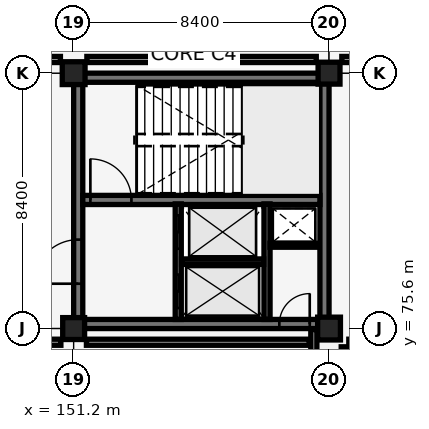
"""IFC4 building model, lengths in metres.
Left out: names, types, materials, properties, quantities, classifications, styles, units other than length and angle.
Written with IfcOpenShell. Run it as: python <this file> out.ifc"""

import sys

from ifc_helpers import new_model, si_unit, direction, frame, frame_2d, origin, origin_2d, place, context, subcontext, project, spatial, rectangle, extrude, element, fill, save


model = new_model("IFC4")
c1 = context("Model", 3, precision=1e-05, world=origin(), true_north=direction((0.0, 1.0)))
c2 = subcontext(c1, "Body", "Model", "MODEL_VIEW")
j1 = project(units=[si_unit("LENGTHUNIT", "METRE"), si_unit("PLANEANGLEUNIT", "RADIAN")], contexts=[c1])
p1 = place(None, origin())
s1 = spatial("IfcSite", under=j1, at=p1, CompositionType="ELEMENT")
p2 = place(p1, origin())
s2 = spatial("IfcBuilding", under=s1, at=p2, CompositionType="ELEMENT")
p3 = place(p2, frame((0.0, 0.0, 5.44)))
s3 = spatial("IfcBuildingStorey", under=s2, at=p3, CompositionType="ELEMENT", Elevation=5.44)
p4 = place(p3, frame((151.35, 75.75, 0.0), z_axis=(0.0, 0.0, 1.0), x_axis=(1.0, 0.0, 0.0)))
e1 = element("IfcWall", 1, at=p4, inside=s3, PredefinedType="SHEAR", context=c2, shape_type="SweptSolid", body=[
    extrude(rectangle(XDim=8.1, YDim=0.3, at=frame_2d((4.05, 0.0))), origin(), (0.0, 0.0, 1.0), 4.12),
])
p5 = place(p4, frame((6.615, 0.0, 0.0)))
e2 = element("IfcOpeningElement", 2, at=p5, cuts=e1, PredefinedType="OPENING", context=c2, shape_type="SweptSolid", body=[
    extrude(rectangle(XDim=1.0, YDim=2.15, at=frame_2d((0.5, 1.075))), frame((0.0, 0.16, 0.0), z_axis=(0.0, -1.0, 0.0), x_axis=(1.0, 0.0, 0.0)), (0.0, 0.0, 1.0), 0.32),
])
p6 = place(p3, frame((151.35, 83.85, 0.0), z_axis=(0.0, 0.0, 1.0), x_axis=(1.0, 0.0, 0.0)))
e3 = element("IfcWall", 3, at=p6, inside=s3, PredefinedType="SHEAR", context=c2, shape_type="SweptSolid", body=[
    extrude(rectangle(XDim=8.1, YDim=0.3, at=frame_2d((4.05, 0.0))), origin(), (0.0, 0.0, 1.0), 4.12),
])
p7 = place(p3, frame((151.35, 75.75, 0.0), z_axis=(0.0, 0.0, 1.0), x_axis=(0.0, 1.0, 0.0)))
e4 = element("IfcWall", 4, at=p7, inside=s3, PredefinedType="SHEAR", context=c2, shape_type="SweptSolid", body=[
    extrude(rectangle(XDim=8.1, YDim=0.3, at=frame_2d((4.05, 0.0))), origin(), (0.0, 0.0, 1.0), 4.12),
])
p8 = place(p7, frame((1.325, 0.0, 0.0)))
e5 = element("IfcOpeningElement", 5, at=p8, cuts=e4, PredefinedType="OPENING", context=c2, shape_type="SweptSolid", body=[
    extrude(rectangle(XDim=1.45, YDim=2.15, at=frame_2d((0.725, 1.075))), frame((0.0, 0.16, 0.0), z_axis=(0.0, -1.0, 0.0), x_axis=(1.0, 0.0, 0.0)), (0.0, 0.0, 1.0), 0.32),
])
p9 = place(p3, frame((159.45, 75.75, 0.0), z_axis=(0.0, 0.0, 1.0), x_axis=(0.0, 1.0, 0.0)))
e6 = element("IfcWall", 6, at=p9, inside=s3, PredefinedType="SHEAR", context=c2, shape_type="SweptSolid", body=[
    extrude(rectangle(XDim=8.1, YDim=0.3, at=frame_2d((4.05, 0.0))), origin(), (0.0, 0.0, 1.0), 4.12),
])
p10 = place(p3, frame((151.5, 79.83, 0.0), z_axis=(0.0, 0.0, 1.0), x_axis=(1.0, 0.0, 0.0)))
e7 = element("IfcWall", 7, at=p10, inside=s3, PredefinedType="SHEAR", context=c2, shape_type="SweptSolid", body=[
    extrude(rectangle(XDim=7.8, YDim=0.3, at=frame_2d((3.9, 0.0))), origin(), (0.0, 0.0, 1.0), 4.12),
])
p11 = place(p10, frame((0.25, 0.0, 0.0)))
e8 = element("IfcOpeningElement", 8, at=p11, cuts=e7, PredefinedType="OPENING", context=c2, shape_type="SweptSolid", body=[
    extrude(rectangle(XDim=1.35, YDim=2.15, at=frame_2d((0.675, 1.075))), frame((0.0, 0.16, 0.0), z_axis=(0.0, -1.0, 0.0), x_axis=(1.0, 0.0, 0.0)), (0.0, 0.0, 1.0), 0.32),
])
p12 = place(p3, frame((151.2, 75.6, 0.0), z_axis=(0.0, 0.0, 1.0), x_axis=(1.0, 0.0, 0.0)))
e9 = element("IfcColumn", 9, at=p12, inside=s3, PredefinedType="COLUMN", context=c2, shape_type="SweptSolid", body=[
    extrude(rectangle(XDim=0.72, YDim=0.72, at=origin_2d()), origin(), (0.0, 0.0, 1.0), 4.12),
])
for number, where, z_axis, x_axis in (
    (10, (151.2, 84.0, 0.0), (0.0, 0.0, 1.0), (1.0, 0.0, 0.0)),
    (11, (159.6, 75.6, 0.0), (0.0, 0.0, 1.0), (1.0, 0.0, 0.0)),
):
    element("IfcColumn", number, at=place(p3, frame(where, z_axis=z_axis, x_axis=x_axis)), inside=s3, PredefinedType="COLUMN", context=c2, shape_type="SweptSolid", body=[
        extrude(rectangle(XDim=0.75, YDim=0.75, at=origin_2d()), origin(), (0.0, 0.0, 1.0), 4.12),
    ])
p13 = place(p3, frame((159.6, 84.0, 0.0), z_axis=(0.0, 0.0, 1.0), x_axis=(1.0, 0.0, 0.0)))
e12 = element("IfcColumn", 12, at=p13, inside=s3, PredefinedType="COLUMN", context=c2, shape_type="SweptSolid", body=[
    extrude(rectangle(XDim=0.72, YDim=0.72, at=origin_2d()), origin(), (0.0, 0.0, 1.0), 4.12),
])
p14 = place(p3, frame((154.64, 75.9, 0.0), z_axis=(0.0, 0.0, 1.0), x_axis=(0.0, 1.0, 0.0)))
e13 = element("IfcWall", 13, at=p14, inside=s3, PredefinedType="SHEAR", context=c2, shape_type="SweptSolid", body=[
    extrude(rectangle(XDim=3.8, YDim=0.2, at=frame_2d((1.9, 0.0))), origin(), (0.0, 0.0, 1.0), 3.44),
])
p15 = place(p14, frame((0.375, 0.0, 0.0)))
e14 = element("IfcOpeningElement", 14, at=p15, cuts=e13, PredefinedType="OPENING", context=c2, shape_type="SweptSolid", body=[
    extrude(rectangle(XDim=1.1, YDim=2.15, at=frame_2d((0.55, 1.075))), frame((0.0, 0.11, 0.0), z_axis=(0.0, -1.0, 0.0), x_axis=(1.0, 0.0, 0.0)), (0.0, 0.0, 1.0), 0.22),
])
p16 = place(p14, frame((2.325, 0.0, 0.0)))
e15 = element("IfcOpeningElement", 15, at=p16, cuts=e13, PredefinedType="OPENING", context=c2, shape_type="SweptSolid", body=[
    extrude(rectangle(XDim=1.1, YDim=2.15, at=frame_2d((0.55, 1.075))), frame((0.0, 0.11, 0.0), z_axis=(0.0, -1.0, 0.0), x_axis=(1.0, 0.0, 0.0)), (0.0, 0.0, 1.0), 0.22),
])
p17 = place(p3, frame((157.56, 75.9, 0.0), z_axis=(0.0, 0.0, 1.0), x_axis=(0.0, 1.0, 0.0)))
e16 = element("IfcWall", 16, at=p17, inside=s3, PredefinedType="SHEAR", context=c2, shape_type="SweptSolid", body=[
    extrude(rectangle(XDim=3.8, YDim=0.2, at=frame_2d((1.9, 0.0))), origin(), (0.0, 0.0, 1.0), 3.44),
])
p18 = place(p3, frame((154.75, 77.8, 0.0), z_axis=(0.0, 0.0, 1.0), x_axis=(1.0, 0.0, 0.0)))
e17 = element("IfcWall", 17, at=p18, inside=s3, PredefinedType="SHEAR", context=c2, shape_type="SweptSolid", body=[
    extrude(rectangle(XDim=2.7, YDim=0.18, at=frame_2d((1.35, 0.0))), origin(), (0.0, 0.0, 1.0), 4.12),
])
p19 = place(p3, frame((157.66, 78.34, 0.0), z_axis=(0.0, 0.0, 1.0), x_axis=(1.0, 0.0, 0.0)))
e18 = element("IfcWall", 18, at=p19, inside=s3, PredefinedType="PARTITIONING", context=c2, shape_type="SweptSolid", body=[
    extrude(rectangle(XDim=1.62, YDim=0.13, at=frame_2d((0.81, 0.0))), origin(), (0.0, 0.0, 1.0), 4.12),
])
p20 = place(p3, frame((143.235, 75.15, 0.0), z_axis=(0.0, 0.0, 1.0), x_axis=(1.0, 0.0, 0.0)))
e19 = element("IfcWall", 19, at=p20, inside=s3, PredefinedType="PARTITIONING", context=c2, shape_type="SweptSolid", body=[
    extrude(rectangle(XDim=7.545, YDim=0.2, at=frame_2d((3.772, 0.0))), origin(), (0.0, 0.0, 1.0), 4.12),
])
p21 = place(p3, frame((151.62, 75.15, 0.0), z_axis=(0.0, 0.0, 1.0), x_axis=(1.0, 0.0, 0.0)))
e20 = element("IfcWall", 20, at=p21, inside=s3, PredefinedType="PARTITIONING", context=c2, shape_type="SweptSolid", body=[
    extrude(rectangle(XDim=7.33, YDim=0.2, at=frame_2d((3.665, 0.0))), origin(), (0.0, 0.0, 1.0), 4.12),
])
p22 = place(p3, frame((159.1, 67.62, 0.0), z_axis=(0.0, 0.0, 1.0), x_axis=(0.0, 1.0, 0.0)))
e21 = element("IfcWall", 21, at=p22, inside=s3, PredefinedType="PARTITIONING", context=c2, shape_type="SweptSolid", body=[
    extrude(rectangle(XDim=7.95, YDim=0.2, at=frame_2d((3.975, 0.0))), origin(), (0.0, 0.0, 1.0), 3.44),
])
p23 = place(p3, frame((160.25, 75.15, 0.0), z_axis=(0.0, 0.0, 1.0), x_axis=(1.0, 0.0, 0.0)))
e22 = element("IfcWall", 22, at=p23, inside=s3, PredefinedType="PARTITIONING", context=c2, shape_type="SweptSolid", body=[
    extrude(rectangle(XDim=7.57, YDim=0.2, at=frame_2d((3.785, 0.0))), origin(), (0.0, 0.0, 1.0), 3.37),
])
p24 = place(p23, frame((3.035, 0.0, 0.0)))
e23 = element("IfcOpeningElement", 23, at=p24, cuts=e22, PredefinedType="OPENING", context=c2, shape_type="SweptSolid", body=[
    extrude(rectangle(XDim=1.5, YDim=2.2, at=frame_2d((0.75, 1.1))), frame((0.0, 0.11, 0.0), z_axis=(0.0, -1.0, 0.0), x_axis=(1.0, 0.0, 0.0)), (0.0, 0.0, 1.0), 0.22),
])
p25 = place(p3, frame((160.1, 67.62, 0.0), z_axis=(0.0, 0.0, 1.0), x_axis=(0.0, 1.0, 0.0)))
e24 = element("IfcWall", 24, at=p25, inside=s3, PredefinedType="PARTITIONING", context=c2, shape_type="SweptSolid", body=[
    extrude(rectangle(XDim=7.38, YDim=0.2, at=frame_2d((3.69, 0.0))), origin(), (0.0, 0.0, 1.0), 3.62),
])
for number, where, z_axis, x_axis in (
    (25, (143.22, 84.45, 0.0), (0.0, 0.0, 1.0), (1.0, 0.0, 0.0)),
    (26, (151.635, 84.45, 0.0), (0.0, 0.0, 1.0), (1.0, 0.0, 0.0)),
):
    element("IfcWall", number, at=place(p3, frame(where, z_axis=z_axis, x_axis=x_axis)), inside=s3, PredefinedType="PARTITIONING", context=c2, shape_type="SweptSolid", body=[
        extrude(rectangle(XDim=7.545, YDim=0.2, at=frame_2d((3.772, 0.0))), origin(), (0.0, 0.0, 1.0), 4.12),
    ])
p26 = place(p3, frame((160.02, 84.45, 0.0), z_axis=(0.0, 0.0, 1.0), x_axis=(1.0, 0.0, 0.0)))
e27 = element("IfcWall", 27, at=p26, inside=s3, PredefinedType="PARTITIONING", context=c2, shape_type="SweptSolid", body=[
    extrude(rectangle(XDim=7.7, YDim=0.2, at=frame_2d((3.85, 0.0))), origin(), (0.0, 0.0, 1.0), 3.37),
])
p27 = place(p11, origin())
e28 = element("IfcDoor", 28, at=p27, inside=s3, OperationType="SINGLE_SWING_LEFT", PredefinedType="DOOR", context=c2, shape_type="SweptSolid", body=[
    extrude(rectangle(XDim=1.35, YDim=2.15, at=frame_2d((0.675, 1.075))), frame((0.0, 0.025, 0.0), z_axis=(0.0, -1.0, 0.0), x_axis=(1.0, 0.0, 0.0)), (0.0, 0.0, 1.0), 0.05),
])
fill(e8, e28)
p28 = place(p15, origin())
e29 = element("IfcDoor", 29, at=p28, inside=s3, OperationType="SLIDING_TO_LEFT", PredefinedType="DOOR", context=c2, shape_type="SweptSolid", body=[
    extrude(rectangle(XDim=1.1, YDim=2.15, at=frame_2d((0.55, 1.075))), frame((0.0, 0.025, 0.0), z_axis=(0.0, -1.0, 0.0), x_axis=(1.0, 0.0, 0.0)), (0.0, 0.0, 1.0), 0.05),
])
fill(e14, e29)
p29 = place(p16, origin())
e30 = element("IfcDoor", 30, at=p29, inside=s3, OperationType="SLIDING_TO_LEFT", PredefinedType="DOOR", context=c2, shape_type="SweptSolid", body=[
    extrude(rectangle(XDim=1.1, YDim=2.15, at=frame_2d((0.55, 1.075))), frame((0.0, 0.025, 0.0), z_axis=(0.0, -1.0, 0.0), x_axis=(1.0, 0.0, 0.0)), (0.0, 0.0, 1.0), 0.05),
])
fill(e15, e30)
p30 = place(p8, origin())
e31 = element("IfcDoor", 31, at=p30, inside=s3, OperationType="DOUBLE_DOOR_SINGLE_SWING", PredefinedType="DOOR", context=c2, shape_type="SweptSolid", body=[
    extrude(rectangle(XDim=1.45, YDim=2.15, at=frame_2d((0.725, 1.075))), frame((0.0, 0.025, 0.0), z_axis=(0.0, -1.0, 0.0), x_axis=(1.0, 0.0, 0.0)), (0.0, 0.0, 1.0), 0.05),
])
fill(e5, e31)
p31 = place(p5, origin())
e32 = element("IfcDoor", 32, at=p31, inside=s3, OperationType="SINGLE_SWING_RIGHT", PredefinedType="DOOR", context=c2, shape_type="SweptSolid", body=[
    extrude(rectangle(XDim=1.0, YDim=2.15, at=frame_2d((0.5, 1.075))), frame((0.0, 0.025, 0.0), z_axis=(0.0, -1.0, 0.0), x_axis=(1.0, 0.0, 0.0)), (0.0, 0.0, 1.0), 0.05),
])
fill(e2, e32)
save(model, sys.argv[1])
